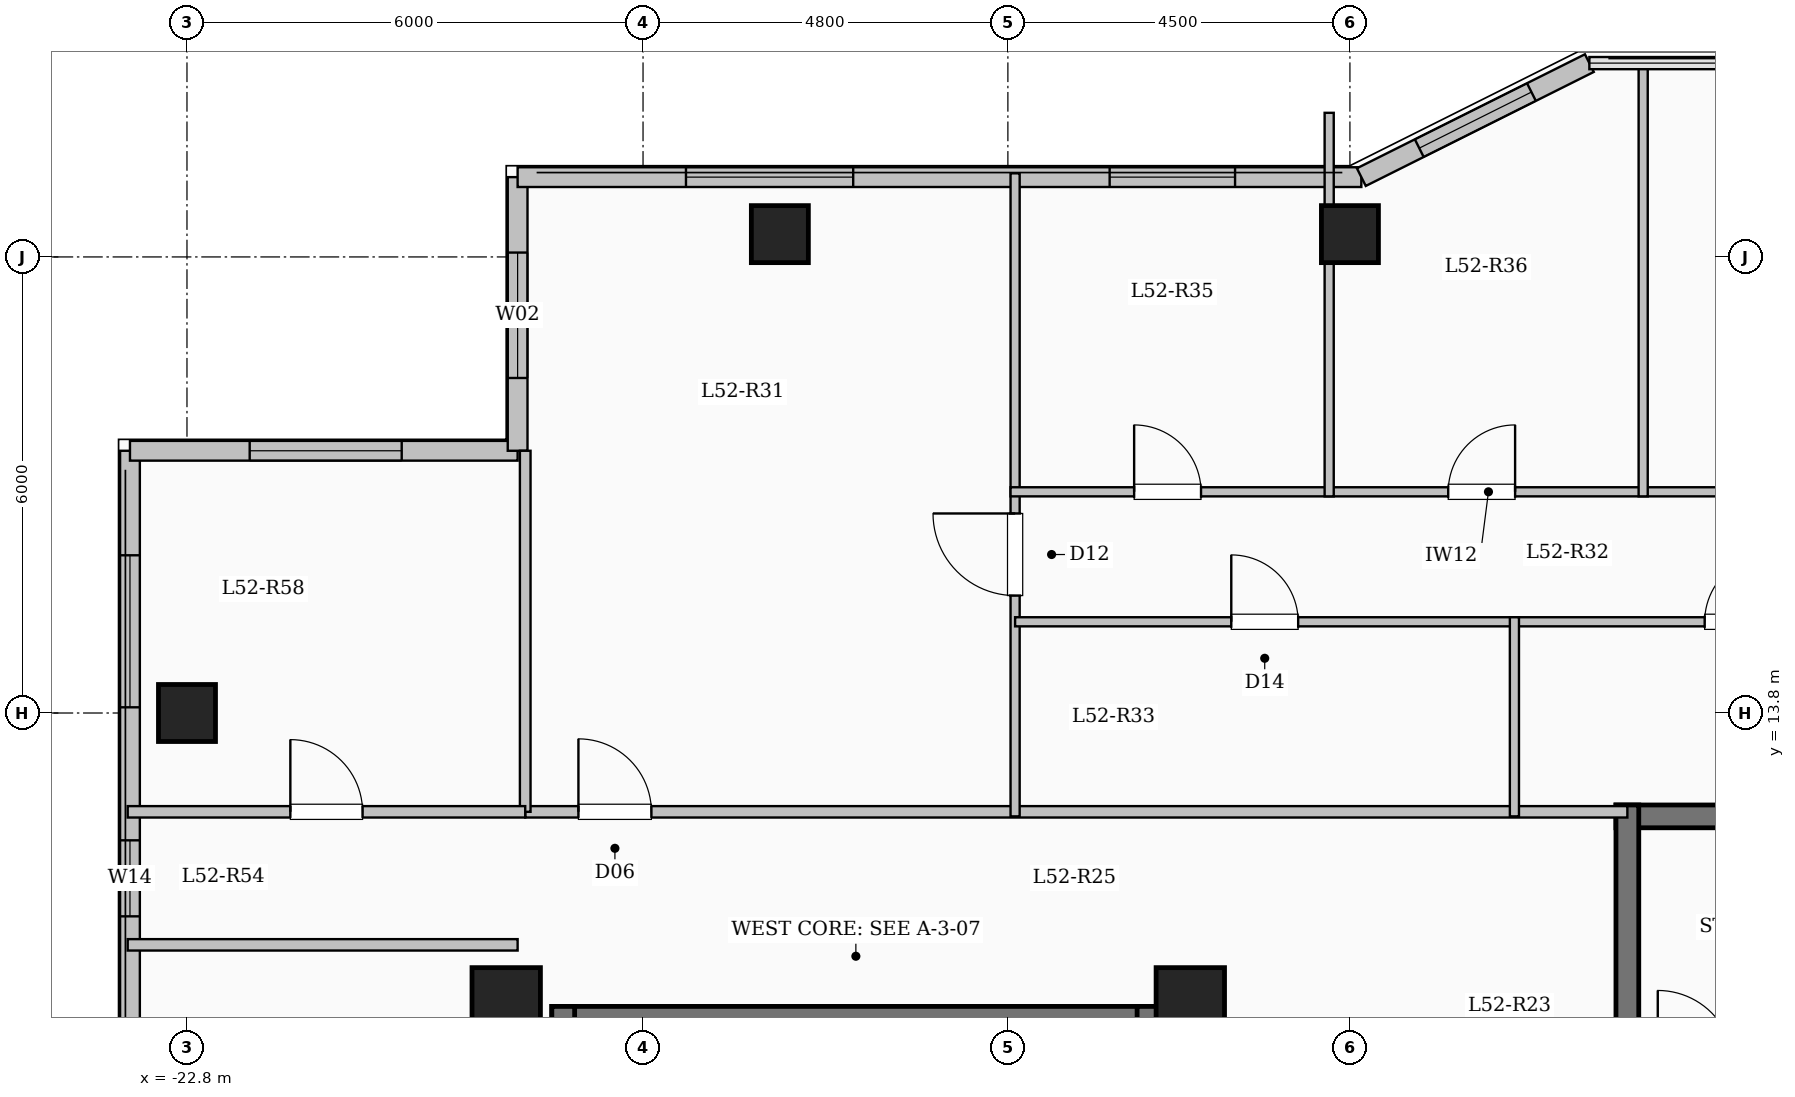
"""IFC4 building model, lengths in metres.
Left out: names, types, materials, properties, quantities, classifications, styles, units other than length and angle.
Written with IfcOpenShell. Run it as: python <this file> out.ifc"""

import sys

from ifc_helpers import new_model, si_unit, direction, frame, frame_2d, origin, origin_2d, place, context, subcontext, project, spatial, rectangle, extrude, element, fill, save


model = new_model("IFC4")
c1 = context("Model", 3, precision=1e-05, world=origin(), true_north=direction((0.0, 1.0)))
c2 = subcontext(c1, "Body", "Model", "MODEL_VIEW")
j1 = project(units=[si_unit("LENGTHUNIT", "METRE"), si_unit("PLANEANGLEUNIT", "RADIAN")], contexts=[c1])
p1 = place(None, origin())
s1 = spatial("IfcSite", under=j1, at=p1, CompositionType="ELEMENT")
p2 = place(p1, origin())
s2 = spatial("IfcBuilding", under=s1, at=p2, CompositionType="ELEMENT")
p3 = place(p2, frame((0.0, 0.0, 193.6)))
s3 = spatial("IfcBuildingStorey", under=s2, at=p3, CompositionType="ELEMENT", Elevation=193.6)
for number, where, z_axis, x_axis in (
    (1, (-9.6, 10.0, 0.0), (0.0, 0.0, 1.0), (1.0, 0.0, 0.0)),
    (2, (-18.6, 10.0, 0.0), (0.0, 0.0, 1.0), (1.0, 0.0, 0.0)),
):
    element("IfcColumn", number, at=place(p3, frame(where, z_axis=z_axis, x_axis=x_axis)), inside=s3, PredefinedType="COLUMN", context=c2, shape_type="SweptSolid", body=[
        extrude(rectangle(XDim=0.9, YDim=0.9, at=origin_2d()), origin(), (0.0, 0.0, 1.0), 3.35),
    ])
for number, where, z_axis, x_axis in (
    (3, (-15.0, 20.1, 0.0), (0.0, 0.0, 1.0), (1.0, 0.0, 0.0)),
    (4, (-7.5, 20.1, 0.0), (0.0, 0.0, 1.0), (1.0, 0.0, 0.0)),
    (5, (-22.8, 13.8, 0.0), (0.0, 0.0, 1.0), (1.0, 0.0, 0.0)),
):
    element("IfcColumn", number, at=place(p3, frame(where, z_axis=z_axis, x_axis=x_axis)), inside=s3, PredefinedType="COLUMN", context=c2, shape_type="SweptSolid", body=[
        extrude(rectangle(XDim=0.75, YDim=0.75, at=origin_2d()), origin(), (0.0, 0.0, 1.0), 3.35),
    ])
p4 = place(p3, frame((-23.55, -17.25, 0.0), z_axis=(0.0, 0.0, 1.0), x_axis=(0.0, 1.0, 0.0)))
e6 = element("IfcWall", 6, at=p4, inside=s3, PredefinedType="SOLIDWALL", context=c2, shape_type="SweptSolid", body=[
    extrude(rectangle(XDim=34.5, YDim=0.26, at=frame_2d((17.25, 0.0))), origin(), (0.0, 0.0, 1.0), 3.1),
])
p5 = place(p4, frame((2.825, 0.0, 0.9)))
e7 = element("IfcOpeningElement", 7, at=p5, cuts=e6, PredefinedType="OPENING", context=c2, shape_type="SweptSolid", body=[
    extrude(rectangle(XDim=2.2, YDim=1.75, at=frame_2d((1.1, 0.875))), frame((0.0, 0.14, 0.0), z_axis=(0.0, -1.0, 0.0), x_axis=(1.0, 0.0, 0.0)), (0.0, 0.0, 1.0), 0.28),
])
p6 = place(p4, frame((8.325, 0.0, 0.95)))
e8 = element("IfcOpeningElement", 8, at=p6, cuts=e6, PredefinedType="OPENING", context=c2, shape_type="SweptSolid", body=[
    extrude(rectangle(XDim=1.2, YDim=1.5, at=frame_2d((0.6, 0.75))), frame((0.0, 0.14, 0.0), z_axis=(0.0, -1.0, 0.0), x_axis=(1.0, 0.0, 0.0)), (0.0, 0.0, 1.0), 0.28),
])
p7 = place(p4, frame((18.0, 0.0, 0.9)))
e9 = element("IfcOpeningElement", 9, at=p7, cuts=e6, PredefinedType="OPENING", context=c2, shape_type="SweptSolid", body=[
    extrude(rectangle(XDim=2.0, YDim=1.7, at=frame_2d((1.0, 0.85))), frame((0.0, 0.14, 0.0), z_axis=(0.0, -1.0, 0.0), x_axis=(1.0, 0.0, 0.0)), (0.0, 0.0, 1.0), 0.28),
])
p8 = place(p4, frame((28.375, 0.0, 0.95)))
e10 = element("IfcOpeningElement", 10, at=p8, cuts=e6, PredefinedType="OPENING", context=c2, shape_type="SweptSolid", body=[
    extrude(rectangle(XDim=1.0, YDim=1.5, at=frame_2d((0.5, 0.75))), frame((0.0, 0.14, 0.0), z_axis=(0.0, -1.0, 0.0), x_axis=(1.0, 0.0, 0.0)), (0.0, 0.0, 1.0), 0.28),
])
p9 = place(p4, frame((31.125, 0.0, 0.9)))
e11 = element("IfcOpeningElement", 11, at=p9, cuts=e6, PredefinedType="OPENING", context=c2, shape_type="SweptSolid", body=[
    extrude(rectangle(XDim=2.0, YDim=1.7, at=frame_2d((1.0, 0.85))), frame((0.0, 0.14, 0.0), z_axis=(0.0, -1.0, 0.0), x_axis=(1.0, 0.0, 0.0)), (0.0, 0.0, 1.0), 0.28),
])
p10 = place(p3, frame((-23.55, 17.25, 0.0), z_axis=(0.0, 0.0, 1.0), x_axis=(1.0, 0.0, 0.0)))
e12 = element("IfcWall", 12, at=p10, inside=s3, PredefinedType="SOLIDWALL", context=c2, shape_type="SweptSolid", body=[
    extrude(rectangle(XDim=5.1, YDim=0.26, at=frame_2d((2.55, 0.0))), origin(), (0.0, 0.0, 1.0), 3.1),
])
p11 = place(p10, frame((1.575, 0.0, 0.9)))
e13 = element("IfcOpeningElement", 13, at=p11, cuts=e12, PredefinedType="OPENING", context=c2, shape_type="SweptSolid", body=[
    extrude(rectangle(XDim=2.0, YDim=1.7, at=frame_2d((1.0, 0.85))), frame((0.0, 0.14, 0.0), z_axis=(0.0, -1.0, 0.0), x_axis=(1.0, 0.0, 0.0)), (0.0, 0.0, 1.0), 0.28),
])
p12 = place(p3, frame((-18.45, 17.25, 0.0), z_axis=(0.0, 0.0, 1.0), x_axis=(0.0, 1.0, 0.0)))
e14 = element("IfcWall", 14, at=p12, inside=s3, PredefinedType="SOLIDWALL", context=c2, shape_type="SweptSolid", body=[
    extrude(rectangle(XDim=3.6, YDim=0.26, at=frame_2d((1.8, 0.0))), origin(), (0.0, 0.0, 1.0), 3.1),
])
p13 = place(p12, frame((0.958, 0.0, 0.9)))
e15 = element("IfcOpeningElement", 15, at=p13, cuts=e14, PredefinedType="OPENING", context=c2, shape_type="SweptSolid", body=[
    extrude(rectangle(XDim=1.65, YDim=1.6, at=frame_2d((0.825, 0.8))), frame((0.0, 0.14, 0.0), z_axis=(0.0, -1.0, 0.0), x_axis=(1.0, 0.0, 0.0)), (0.0, 0.0, 1.0), 0.28),
])
p14 = place(p3, frame((-18.45, 20.85, 0.0), z_axis=(0.0, 0.0, 1.0), x_axis=(1.0, 0.0, 0.0)))
e16 = element("IfcWall", 16, at=p14, inside=s3, PredefinedType="SOLIDWALL", context=c2, shape_type="SweptSolid", body=[
    extrude(rectangle(XDim=11.1, YDim=0.26, at=frame_2d((5.55, 0.0))), origin(), (0.0, 0.0, 1.0), 3.1),
])
p15 = place(p14, frame((2.215, 0.0, 0.9)))
e17 = element("IfcOpeningElement", 17, at=p15, cuts=e16, PredefinedType="OPENING", context=c2, shape_type="SweptSolid", body=[
    extrude(rectangle(XDim=2.2, YDim=1.75, at=frame_2d((1.1, 0.875))), frame((0.0, 0.14, 0.0), z_axis=(0.0, -1.0, 0.0), x_axis=(1.0, 0.0, 0.0)), (0.0, 0.0, 1.0), 0.28),
])
p16 = place(p14, frame((7.789, 0.0, 0.9)))
e18 = element("IfcOpeningElement", 18, at=p16, cuts=e16, PredefinedType="OPENING", context=c2, shape_type="SweptSolid", body=[
    extrude(rectangle(XDim=1.65, YDim=1.6, at=frame_2d((0.825, 0.8))), frame((0.0, 0.14, 0.0), z_axis=(0.0, -1.0, 0.0), x_axis=(1.0, 0.0, 0.0)), (0.0, 0.0, 1.0), 0.28),
])
p17 = place(p3, frame((-7.35, 20.85, 0.0), z_axis=(0.0, 0.0, 1.0), x_axis=(0.894427191, 0.4472135955, 0.0)))
e19 = element("IfcWall", 19, at=p17, inside=s3, PredefinedType="SOLIDWALL", context=c2, shape_type="SweptSolid", body=[
    extrude(rectangle(XDim=3.354, YDim=0.26, at=frame_2d((1.677, 0.0))), origin(), (0.0, 0.0, 1.0), 3.1),
])
p18 = place(p17, frame((0.852, 0.0, 0.9)))
e20 = element("IfcOpeningElement", 20, at=p18, cuts=e19, PredefinedType="OPENING", context=c2, shape_type="SweptSolid", body=[
    extrude(rectangle(XDim=1.65, YDim=1.6, at=frame_2d((0.825, 0.8))), frame((0.0, 0.14, 0.0), z_axis=(0.0, -1.0, 0.0), x_axis=(1.0, 0.0, 0.0)), (0.0, 0.0, 1.0), 0.28),
])
p19 = place(p3, frame((-18.0, 9.79, 0.0), z_axis=(0.0, 0.0, 1.0), x_axis=(1.0, 0.0, 0.0)))
e21 = element("IfcWall", 21, at=p19, inside=s3, PredefinedType="SHEAR", context=c2, shape_type="SweptSolid", body=[
    extrude(rectangle(XDim=8.0, YDim=0.3, at=frame_2d((4.0, 0.0))), origin(), (0.0, 0.0, 1.0), 3.35),
])
for number, where, z_axis, x_axis in (
    (22, (-17.85, 6.35, 0.0), (0.0, 0.0, 1.0), (0.0, 1.0, 0.0)),
    (23, (-10.15, 6.35, 0.0), (0.0, 0.0, 1.0), (0.0, 1.0, 0.0)),
):
    element("IfcWall", number, at=place(p3, frame(where, z_axis=z_axis, x_axis=x_axis)), inside=s3, PredefinedType="SHEAR", context=c2, shape_type="SweptSolid", body=[
        extrude(rectangle(XDim=3.59, YDim=0.3, at=frame_2d((1.795, 0.0))), origin(), (0.0, 0.0, 1.0), 3.35),
    ])
p20 = place(p3, frame((-4.0, 12.44, 0.0), z_axis=(0.0, 0.0, 1.0), x_axis=(1.0, 0.0, 0.0)))
e24 = element("IfcWall", 24, at=p20, inside=s3, PredefinedType="SHEAR", context=c2, shape_type="SweptSolid", body=[
    extrude(rectangle(XDim=8.0, YDim=0.3, at=frame_2d((4.0, 0.0))), origin(), (0.0, 0.0, 1.0), 3.35),
])
p21 = place(p3, frame((-3.85, 9.0, 0.0), z_axis=(0.0, 0.0, 1.0), x_axis=(0.0, 1.0, 0.0)))
e25 = element("IfcWall", 25, at=p21, inside=s3, PredefinedType="SHEAR", context=c2, shape_type="SweptSolid", body=[
    extrude(rectangle(XDim=3.59, YDim=0.3, at=frame_2d((1.795, 0.0))), origin(), (0.0, 0.0, 1.0), 3.35),
])
p22 = place(p3, frame((-18.35, 12.5, 0.0), z_axis=(0.0, 0.0, 1.0), x_axis=(1.0, 0.0, 0.0)))
e26 = element("IfcWall", 26, at=p22, inside=s3, PredefinedType="PARTITIONING", context=c2, shape_type="SweptSolid", body=[
    extrude(rectangle(XDim=14.5, YDim=0.15, at=frame_2d((7.25, 0.0))), origin(), (0.0, 0.0, 1.0), 3.1),
])
p23 = place(p22, frame((0.7, 0.0, 0.0)))
e27 = element("IfcOpeningElement", 27, at=p23, cuts=e26, PredefinedType="OPENING", context=c2, shape_type="SweptSolid", body=[
    extrude(rectangle(XDim=0.96, YDim=2.15, at=frame_2d((0.48, 1.075))), frame((0.0, 0.085, 0.0), z_axis=(0.0, -1.0, 0.0), x_axis=(1.0, 0.0, 0.0)), (0.0, 0.0, 1.0), 0.17),
])
p24 = place(p3, frame((-11.905, 12.44, 0.0), z_axis=(0.0, 0.0, 1.0), x_axis=(0.0, 1.0, 0.0)))
e28 = element("IfcWall", 28, at=p24, inside=s3, PredefinedType="PARTITIONING", context=c2, shape_type="SweptSolid", body=[
    extrude(rectangle(XDim=8.46, YDim=0.12, at=frame_2d((4.23, 0.0))), origin(), (0.0, 0.0, 1.0), 3.1),
])
p25 = place(p24, frame((2.905, 0.0, 0.0)))
e29 = element("IfcOpeningElement", 29, at=p25, cuts=e28, PredefinedType="OPENING", context=c2, shape_type="SweptSolid", body=[
    extrude(rectangle(XDim=1.08, YDim=2.15, at=frame_2d((0.54, 1.075))), frame((0.0, 0.07, 0.0), z_axis=(0.0, -1.0, 0.0), x_axis=(1.0, 0.0, 0.0)), (0.0, 0.0, 1.0), 0.14),
])
p26 = place(p3, frame((-11.905, 15.0, 0.0), z_axis=(0.0, 0.0, 1.0), x_axis=(1.0, 0.0, 0.0)))
e30 = element("IfcWall", 30, at=p26, inside=s3, PredefinedType="PARTITIONING", context=c2, shape_type="SweptSolid", body=[
    extrude(rectangle(XDim=6.569, YDim=0.12, at=frame_2d((3.285, 0.0))), origin(), (0.0, 0.0, 1.0), 3.1),
])
p27 = place(p26, frame((2.844, 0.0, 0.0)))
e31 = element("IfcOpeningElement", 31, at=p27, cuts=e30, PredefinedType="OPENING", context=c2, shape_type="SweptSolid", body=[
    extrude(rectangle(XDim=0.88, YDim=2.1, at=frame_2d((0.44, 1.05))), frame((0.0, 0.07, 0.0), z_axis=(0.0, -1.0, 0.0), x_axis=(1.0, 0.0, 0.0)), (0.0, 0.0, 1.0), 0.14),
])
p28 = place(p3, frame((-5.336, 15.0, 0.0), z_axis=(0.0, 0.0, 1.0), x_axis=(1.0, 0.0, 0.0)))
e32 = element("IfcWall", 32, at=p28, inside=s3, PredefinedType="PARTITIONING", context=c2, shape_type="SweptSolid", body=[
    extrude(rectangle(XDim=5.886, YDim=0.12, at=frame_2d((2.943, 0.0))), origin(), (0.0, 0.0, 1.0), 3.1),
])
p29 = place(p28, frame((2.503, 0.0, 0.0)))
e33 = element("IfcOpeningElement", 33, at=p29, cuts=e32, PredefinedType="OPENING", context=c2, shape_type="SweptSolid", body=[
    extrude(rectangle(XDim=0.88, YDim=2.1, at=frame_2d((0.44, 1.05))), frame((0.0, 0.07, 0.0), z_axis=(0.0, -1.0, 0.0), x_axis=(1.0, 0.0, 0.0)), (0.0, 0.0, 1.0), 0.14),
])
p30 = place(p3, frame((-11.965, 16.71, 0.0), z_axis=(0.0, 0.0, 1.0), x_axis=(1.0, 0.0, 0.0)))
e34 = element("IfcWall", 34, at=p30, inside=s3, PredefinedType="PARTITIONING", context=c2, shape_type="SweptSolid", body=[
    extrude(rectangle(XDim=12.575, YDim=0.12, at=frame_2d((6.288, 0.0))), origin(), (0.0, 0.0, 1.0), 2.725),
])
p31 = place(p30, frame((1.626, 0.0, 0.0)))
e35 = element("IfcOpeningElement", 35, at=p31, cuts=e34, PredefinedType="OPENING", context=c2, shape_type="SweptSolid", body=[
    extrude(rectangle(XDim=0.88, YDim=2.1, at=frame_2d((0.44, 1.05))), frame((0.0, 0.07, 0.0), z_axis=(0.0, -1.0, 0.0), x_axis=(1.0, 0.0, 0.0)), (0.0, 0.0, 1.0), 0.14),
])
p32 = place(p30, frame((5.758, 0.0, 0.0)))
e36 = element("IfcOpeningElement", 36, at=p32, cuts=e34, PredefinedType="OPENING", context=c2, shape_type="SweptSolid", body=[
    extrude(rectangle(XDim=0.88, YDim=2.1, at=frame_2d((0.44, 1.05))), frame((0.0, 0.07, 0.0), z_axis=(0.0, -1.0, 0.0), x_axis=(1.0, 0.0, 0.0)), (0.0, 0.0, 1.0), 0.14),
])
p33 = place(p30, frame((9.889, 0.0, 0.0)))
e37 = element("IfcOpeningElement", 37, at=p33, cuts=e34, PredefinedType="OPENING", context=c2, shape_type="SweptSolid", body=[
    extrude(rectangle(XDim=0.88, YDim=2.1, at=frame_2d((0.44, 1.05))), frame((0.0, 0.07, 0.0), z_axis=(0.0, -1.0, 0.0), x_axis=(1.0, 0.0, 0.0)), (0.0, 0.0, 1.0), 0.14),
])
p34 = place(p3, frame((-5.336, 12.44, 0.0), z_axis=(0.0, 0.0, 1.0), x_axis=(0.0, 1.0, 0.0)))
e38 = element("IfcWall", 38, at=p34, inside=s3, PredefinedType="PARTITIONING", context=c2, shape_type="SweptSolid", body=[
    extrude(rectangle(XDim=2.62, YDim=0.12, at=frame_2d((1.31, 0.0))), origin(), (0.0, 0.0, 1.0), 3.1),
])
p35 = place(p3, frame((-7.773, 16.65, 0.0), z_axis=(0.0, 0.0, 1.0), x_axis=(0.0, 1.0, 0.0)))
e39 = element("IfcWall", 39, at=p35, inside=s3, PredefinedType="PARTITIONING", context=c2, shape_type="SweptSolid", body=[
    extrude(rectangle(XDim=5.046, YDim=0.12, at=frame_2d((2.523, 0.0))), origin(), (0.0, 0.0, 1.0), 2.585),
])
p36 = place(p3, frame((-3.642, 16.65, 0.0), z_axis=(0.0, 0.0, 1.0), x_axis=(0.0, 1.0, 0.0)))
e40 = element("IfcWall", 40, at=p36, inside=s3, PredefinedType="PARTITIONING", context=c2, shape_type="SweptSolid", body=[
    extrude(rectangle(XDim=5.73, YDim=0.12, at=frame_2d((2.865, 0.0))), origin(), (0.0, 0.0, 1.0), 3.1),
])
p37 = place(p3, frame((-23.58, 10.75, 0.0), z_axis=(0.0, 0.0, 1.0), x_axis=(1.0, 0.0, 0.0)))
e41 = element("IfcWall", 41, at=p37, inside=s3, PredefinedType="PARTITIONING", context=c2, shape_type="SweptSolid", body=[
    extrude(rectangle(XDim=5.13, YDim=0.15, at=frame_2d((2.565, 0.0))), origin(), (0.0, 0.0, 1.0), 3.1),
])
p38 = place(p3, frame((-18.35, 12.5, 0.0), z_axis=(0.0, 0.0, 1.0), x_axis=(0.0, 1.0, 0.0)))
e42 = element("IfcWall", 42, at=p38, inside=s3, PredefinedType="PARTITIONING", context=c2, shape_type="SweptSolid", body=[
    extrude(rectangle(XDim=4.75, YDim=0.14, at=frame_2d((2.375, 0.0))), origin(), (0.0, 0.0, 1.0), 3.1),
])
p39 = place(p3, frame((-23.58, 12.5, 0.0), z_axis=(0.0, 0.0, 1.0), x_axis=(1.0, 0.0, 0.0)))
e43 = element("IfcWall", 43, at=p39, inside=s3, PredefinedType="PARTITIONING", context=c2, shape_type="SweptSolid", body=[
    extrude(rectangle(XDim=5.23, YDim=0.15, at=frame_2d((2.615, 0.0))), origin(), (0.0, 0.0, 1.0), 3.1),
])
p40 = place(p39, frame((2.14, 0.0, 0.0)))
e44 = element("IfcOpeningElement", 44, at=p40, cuts=e43, PredefinedType="OPENING", context=c2, shape_type="SweptSolid", body=[
    extrude(rectangle(XDim=0.95, YDim=2.15, at=frame_2d((0.475, 1.075))), frame((0.0, 0.085, 0.0), z_axis=(0.0, -1.0, 0.0), x_axis=(1.0, 0.0, 0.0)), (0.0, 0.0, 1.0), 0.17),
])
p41 = place(p8, origin())
e45 = element("IfcWindow", 45, at=p41, inside=s3, PartitioningType="SINGLE_PANEL", PredefinedType="WINDOW", context=c2, shape_type="SweptSolid", body=[
    extrude(rectangle(XDim=1.0, YDim=1.5, at=frame_2d((0.5, 0.75))), frame((0.0, 0.03, 0.0), z_axis=(0.0, -1.0, 0.0), x_axis=(1.0, 0.0, 0.0)), (0.0, 0.0, 1.0), 0.06),
])
fill(e10, e45)
p42 = place(p9, origin())
e46 = element("IfcWindow", 46, at=p42, inside=s3, PartitioningType="SINGLE_PANEL", PredefinedType="WINDOW", context=c2, shape_type="SweptSolid", body=[
    extrude(rectangle(XDim=2.0, YDim=1.7, at=frame_2d((1.0, 0.85))), frame((0.0, 0.03, 0.0), z_axis=(0.0, -1.0, 0.0), x_axis=(1.0, 0.0, 0.0)), (0.0, 0.0, 1.0), 0.06),
])
fill(e11, e46)
p43 = place(p11, origin())
e47 = element("IfcWindow", 47, at=p43, inside=s3, PartitioningType="SINGLE_PANEL", PredefinedType="WINDOW", context=c2, shape_type="SweptSolid", body=[
    extrude(rectangle(XDim=2.0, YDim=1.7, at=frame_2d((1.0, 0.85))), frame((0.0, 0.03, 0.0), z_axis=(0.0, -1.0, 0.0), x_axis=(1.0, 0.0, 0.0)), (0.0, 0.0, 1.0), 0.06),
])
fill(e13, e47)
p44 = place(p13, origin())
e48 = element("IfcWindow", 48, at=p44, inside=s3, PartitioningType="SINGLE_PANEL", PredefinedType="WINDOW", context=c2, shape_type="SweptSolid", body=[
    extrude(rectangle(XDim=1.65, YDim=1.6, at=frame_2d((0.825, 0.8))), frame((0.0, 0.03, 0.0), z_axis=(0.0, -1.0, 0.0), x_axis=(1.0, 0.0, 0.0)), (0.0, 0.0, 1.0), 0.06),
])
fill(e15, e48)
p45 = place(p15, origin())
e49 = element("IfcWindow", 49, at=p45, inside=s3, PartitioningType="SINGLE_PANEL", PredefinedType="WINDOW", context=c2, shape_type="SweptSolid", body=[
    extrude(rectangle(XDim=2.2, YDim=1.75, at=frame_2d((1.1, 0.875))), frame((0.0, 0.03, 0.0), z_axis=(0.0, -1.0, 0.0), x_axis=(1.0, 0.0, 0.0)), (0.0, 0.0, 1.0), 0.06),
])
fill(e17, e49)
p46 = place(p16, origin())
e50 = element("IfcWindow", 50, at=p46, inside=s3, PartitioningType="SINGLE_PANEL", PredefinedType="WINDOW", context=c2, shape_type="SweptSolid", body=[
    extrude(rectangle(XDim=1.65, YDim=1.6, at=frame_2d((0.825, 0.8))), frame((0.0, 0.03, 0.0), z_axis=(0.0, -1.0, 0.0), x_axis=(1.0, 0.0, 0.0)), (0.0, 0.0, 1.0), 0.06),
])
fill(e18, e50)
p47 = place(p18, origin())
e51 = element("IfcWindow", 51, at=p47, inside=s3, PartitioningType="SINGLE_PANEL", PredefinedType="WINDOW", context=c2, shape_type="SweptSolid", body=[
    extrude(rectangle(XDim=1.65, YDim=1.6, at=frame_2d((0.825, 0.8))), frame((0.0, 0.03, 0.0), z_axis=(0.0, -1.0, 0.0), x_axis=(1.0, 0.0, 0.0)), (0.0, 0.0, 1.0), 0.06),
])
fill(e20, e51)
p48 = place(p23, origin())
e52 = element("IfcDoor", 52, at=p48, inside=s3, OperationType="SINGLE_SWING_LEFT", PredefinedType="DOOR", context=c2, shape_type="SweptSolid", body=[
    extrude(rectangle(XDim=0.96, YDim=2.15, at=frame_2d((0.48, 1.075))), frame((0.0, 0.025, 0.0), z_axis=(0.0, -1.0, 0.0), x_axis=(1.0, 0.0, 0.0)), (0.0, 0.0, 1.0), 0.05),
])
fill(e27, e52)
p49 = place(p25, origin())
e53 = element("IfcDoor", 53, at=p49, inside=s3, OperationType="SINGLE_SWING_RIGHT", PredefinedType="DOOR", context=c2, shape_type="SweptSolid", body=[
    extrude(rectangle(XDim=1.08, YDim=2.15, at=frame_2d((0.54, 1.075))), frame((0.0, 0.025, 0.0), z_axis=(0.0, -1.0, 0.0), x_axis=(1.0, 0.0, 0.0)), (0.0, 0.0, 1.0), 0.05),
])
fill(e29, e53)
p50 = place(p27, origin())
e54 = element("IfcDoor", 54, at=p50, inside=s3, OperationType="SINGLE_SWING_LEFT", PredefinedType="DOOR", context=c2, shape_type="SweptSolid", body=[
    extrude(rectangle(XDim=0.88, YDim=2.1, at=frame_2d((0.44, 1.05))), frame((0.0, 0.025, 0.0), z_axis=(0.0, -1.0, 0.0), x_axis=(1.0, 0.0, 0.0)), (0.0, 0.0, 1.0), 0.05),
])
fill(e31, e54)
p51 = place(p29, origin())
e55 = element("IfcDoor", 55, at=p51, inside=s3, OperationType="SINGLE_SWING_RIGHT", PredefinedType="DOOR", context=c2, shape_type="SweptSolid", body=[
    extrude(rectangle(XDim=0.88, YDim=2.1, at=frame_2d((0.44, 1.05))), frame((0.0, 0.025, 0.0), z_axis=(0.0, -1.0, 0.0), x_axis=(1.0, 0.0, 0.0)), (0.0, 0.0, 1.0), 0.05),
])
fill(e33, e55)
p52 = place(p31, origin())
e56 = element("IfcDoor", 56, at=p52, inside=s3, OperationType="SINGLE_SWING_LEFT", PredefinedType="DOOR", context=c2, shape_type="SweptSolid", body=[
    extrude(rectangle(XDim=0.88, YDim=2.1, at=frame_2d((0.44, 1.05))), frame((0.0, 0.025, 0.0), z_axis=(0.0, -1.0, 0.0), x_axis=(1.0, 0.0, 0.0)), (0.0, 0.0, 1.0), 0.05),
])
fill(e35, e56)
p53 = place(p32, origin())
e57 = element("IfcDoor", 57, at=p53, inside=s3, OperationType="SINGLE_SWING_RIGHT", PredefinedType="DOOR", context=c2, shape_type="SweptSolid", body=[
    extrude(rectangle(XDim=0.88, YDim=2.1, at=frame_2d((0.44, 1.05))), frame((0.0, 0.025, 0.0), z_axis=(0.0, -1.0, 0.0), x_axis=(1.0, 0.0, 0.0)), (0.0, 0.0, 1.0), 0.05),
])
fill(e36, e57)
p54 = place(p40, origin())
e58 = element("IfcDoor", 58, at=p54, inside=s3, OperationType="SINGLE_SWING_LEFT", PredefinedType="DOOR", context=c2, shape_type="SweptSolid", body=[
    extrude(rectangle(XDim=0.95, YDim=2.15, at=frame_2d((0.475, 1.075))), frame((0.0, 0.025, 0.0), z_axis=(0.0, -1.0, 0.0), x_axis=(1.0, 0.0, 0.0)), (0.0, 0.0, 1.0), 0.05),
])
fill(e44, e58)
save(model, sys.argv[1])
